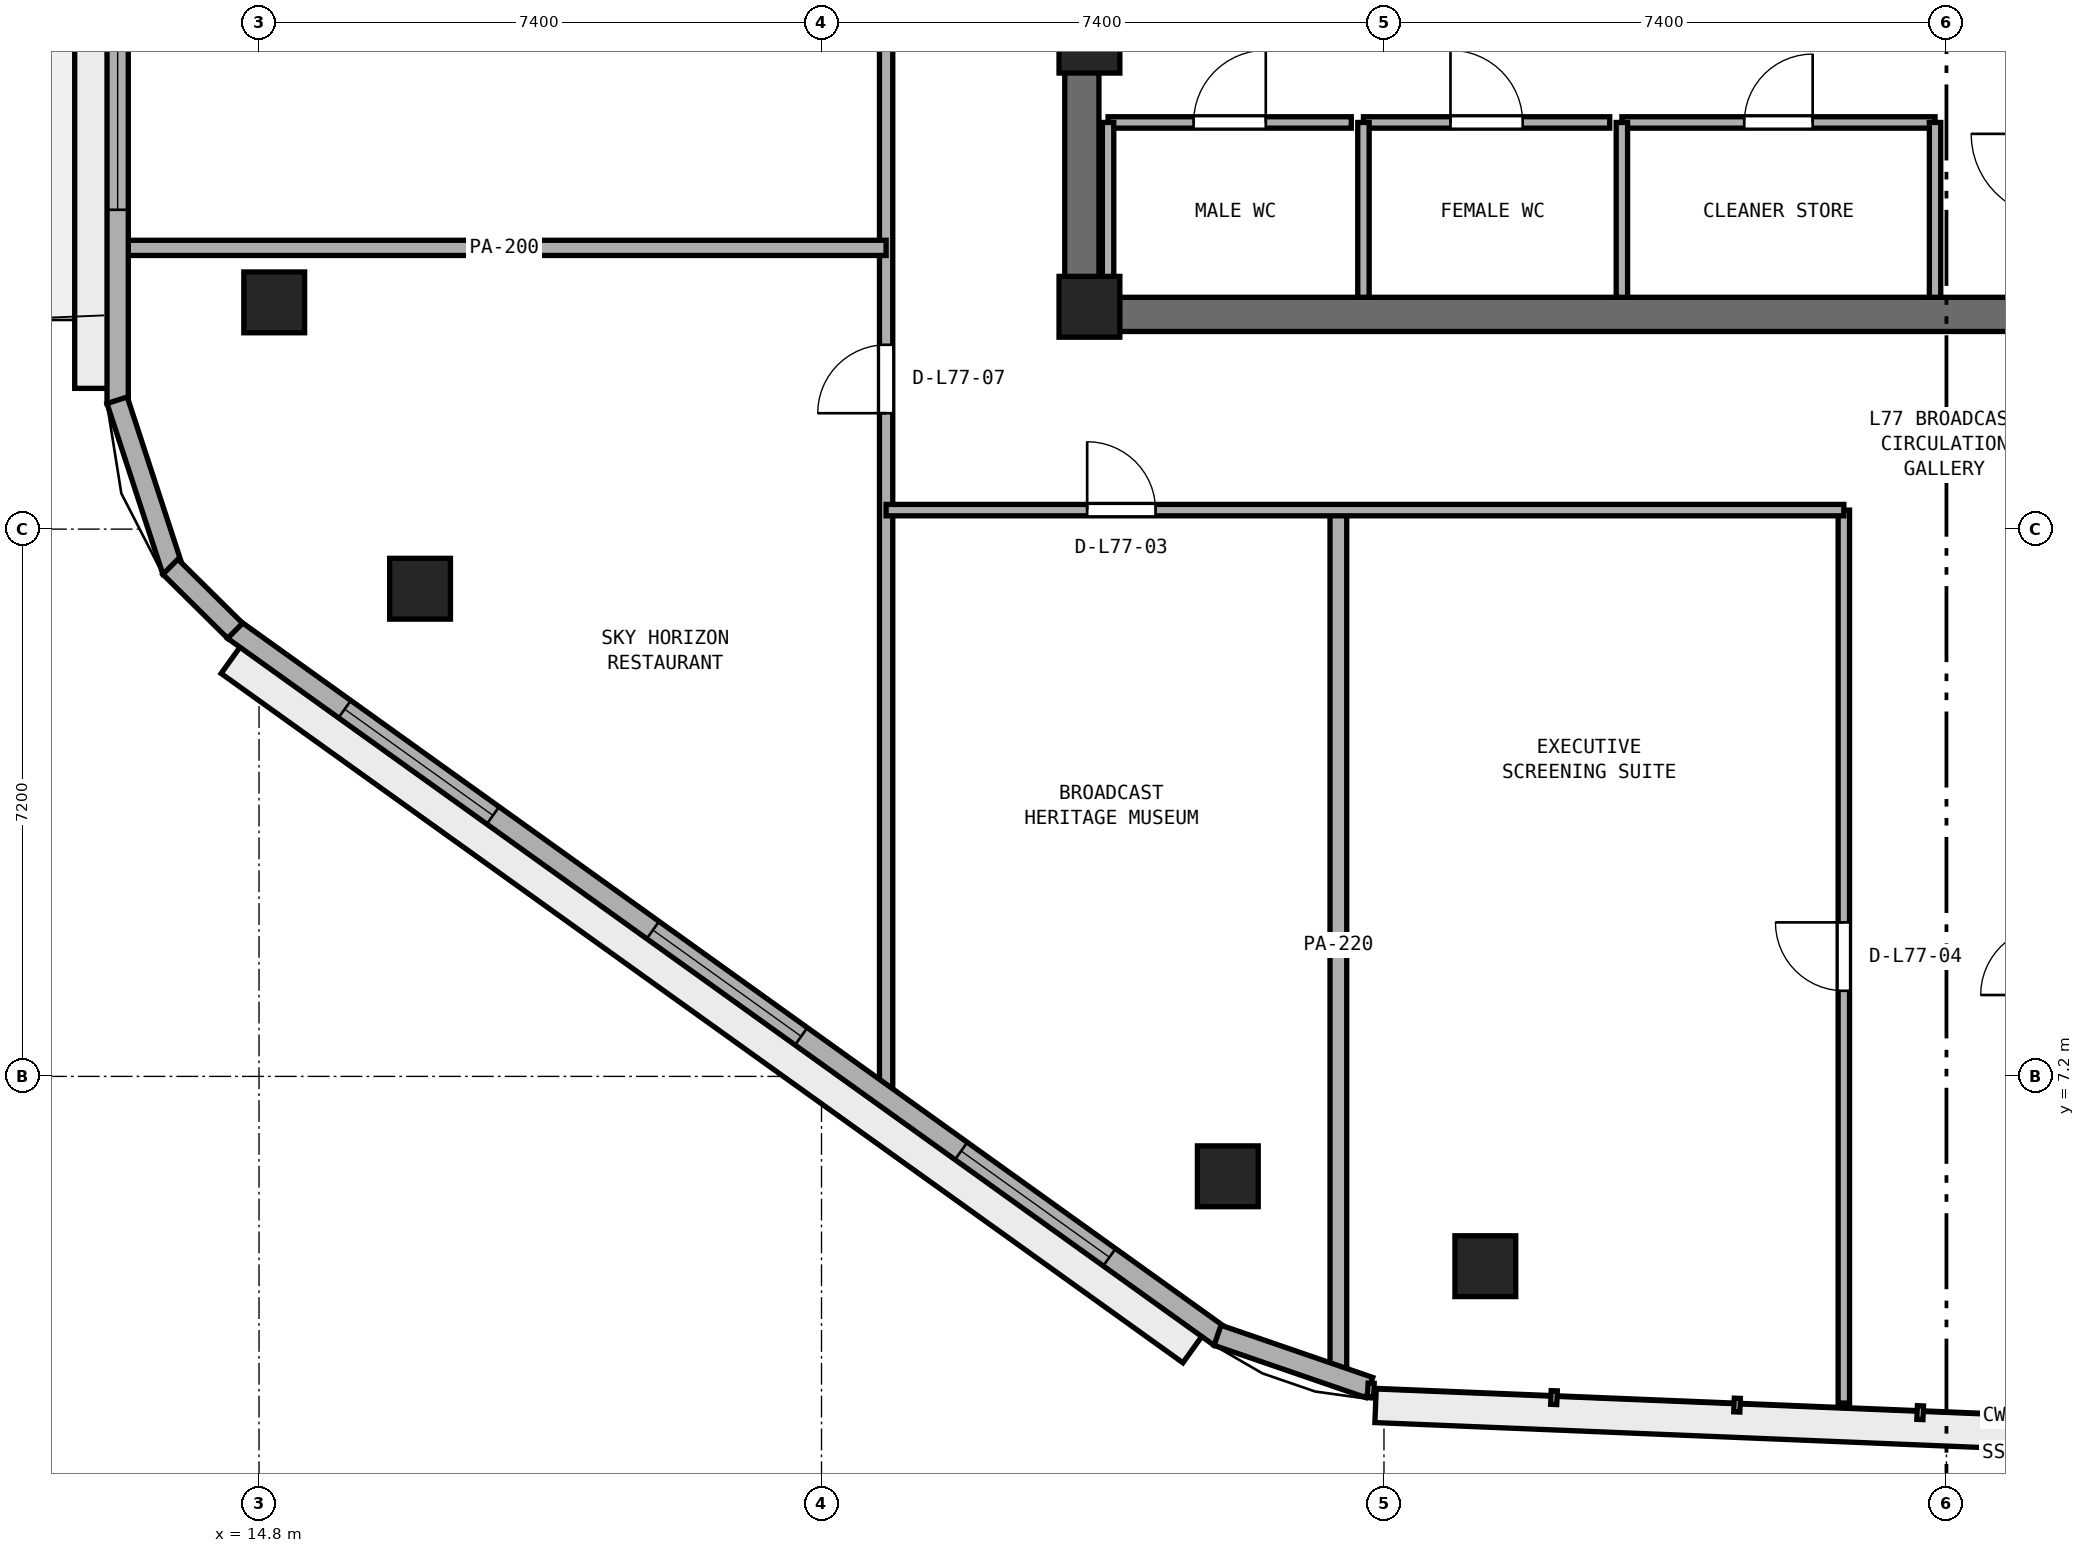
"""IFC4 building model, lengths in metres.
Left out: names, types, materials, properties, quantities, classifications, styles, units other than length and angle.
Written with IfcOpenShell. Run it as: python <this file> out.ifc"""

import sys

from ifc_helpers import new_model, si_unit, direction, frame, frame_2d, origin, origin_2d, place, context, subcontext, project, spatial, rectangle, extrude, element, fill, save


model = new_model("IFC4")
c1 = context("Model", 3, precision=1e-05, world=origin(), true_north=direction((0.0, 1.0)))
c2 = subcontext(c1, "Body", "Model", "MODEL_VIEW")
j1 = project(units=[si_unit("LENGTHUNIT", "METRE"), si_unit("PLANEANGLEUNIT", "RADIAN")], contexts=[c1])
p1 = place(None, origin())
s1 = spatial("IfcSite", under=j1, at=p1, CompositionType="ELEMENT")
p2 = place(p1, origin())
s2 = spatial("IfcBuilding", under=s1, at=p2, CompositionType="ELEMENT")
p3 = place(p2, frame((0.0, 0.0, 301.0)))
s3 = spatial("IfcBuildingStorey", under=s2, at=p3, CompositionType="ELEMENT", Elevation=301.0)
p4 = place(p3, frame((25.4, 17.225, 0.0), z_axis=(0.0, 0.0, 1.0), x_axis=(1.0, 0.0, 0.0)))
e1 = element("IfcWall", 1, at=p4, inside=s3, PredefinedType="SHEAR", context=c2, shape_type="SweptSolid", body=[
    extrude(rectangle(XDim=23.2, YDim=0.45, at=frame_2d((11.6, 0.0))), origin(), (0.0, 0.0, 1.0), 3.54),
])
p5 = place(p3, frame((25.625, 17.45, 0.0), z_axis=(0.0, 0.0, 1.0), x_axis=(0.0, 1.0, 0.0)))
e2 = element("IfcWall", 2, at=p5, inside=s3, PredefinedType="SHEAR", context=c2, shape_type="SweptSolid", body=[
    extrude(rectangle(XDim=15.5, YDim=0.45, at=frame_2d((7.75, 0.0))), origin(), (0.0, 0.0, 1.0), 3.54),
])
p6 = place(p5, frame((7.0, 0.0, 0.0)))
e3 = element("IfcOpeningElement", 3, at=p6, cuts=e2, PredefinedType="OPENING", context=c2, shape_type="SweptSolid", body=[
    extrude(rectangle(XDim=1.5, YDim=2.15, at=frame_2d((0.75, 1.075))), frame((0.0, 0.235, 0.0), z_axis=(0.0, -1.0, 0.0), x_axis=(1.0, 0.0, 0.0)), (0.0, 0.0, 1.0), 0.47),
])
for number, where, z_axis, x_axis in (
    (4, (25.725, 17.325, 0.0), (0.0, 0.0, 1.0), (1.0, 0.0, 0.0)),
    (5, (25.725, 20.8, 0.0), (0.0, 0.0, 1.0), (1.0, 0.0, 0.0)),
):
    element("IfcColumn", number, at=place(p3, frame(where, z_axis=z_axis, x_axis=x_axis)), inside=s3, PredefinedType="PILASTER", context=c2, shape_type="SweptSolid", body=[
        extrude(rectangle(XDim=0.8, YDim=0.8, at=origin_2d()), origin(), (0.0, 0.0, 1.0), 3.8),
    ])
for number, where, z_axis, x_axis in (
    (6, (30.934, 4.703, 0.0), (0.0, 0.0, 1.0), (1.0, 0.0, 0.0)),
    (7, (15.0, 17.383, 0.0), (0.0, 0.0, 1.0), (1.0, 0.0, 0.0)),
    (8, (16.918, 13.616, 0.0), (0.0, 0.0, 1.0), (1.0, 0.0, 0.0)),
    (9, (27.545, 5.886, 0.0), (0.0, 0.0, 1.0), (1.0, 0.0, 0.0)),
):
    element("IfcColumn", number, at=place(p3, frame(where, z_axis=z_axis, x_axis=x_axis)), inside=s3, PredefinedType="COLUMN", context=c2, shape_type="SweptSolid", body=[
        extrude(rectangle(XDim=0.8, YDim=0.8, at=origin_2d()), origin(), (0.0, 0.0, 1.0), 3.8),
    ])
p7 = place(p3, frame((25.97, 19.75, 0.0), z_axis=(0.0, 0.0, 1.0), x_axis=(1.0, 0.0, 0.0)))
e10 = element("IfcWall", 10, at=p7, inside=s3, PredefinedType="PARTITIONING", context=c2, shape_type="SweptSolid", body=[
    extrude(rectangle(XDim=3.2, YDim=0.15, at=frame_2d((1.6, 0.0))), origin(), (0.0, 0.0, 1.0), 3.54),
])
p8 = place(p7, frame((1.125, 0.0, 0.0)))
e11 = element("IfcOpeningElement", 11, at=p8, cuts=e10, PredefinedType="OPENING", context=c2, shape_type="SweptSolid", body=[
    extrude(rectangle(XDim=0.95, YDim=2.1, at=frame_2d((0.475, 1.05))), frame((0.0, 0.085, 0.0), z_axis=(0.0, -1.0, 0.0), x_axis=(1.0, 0.0, 0.0)), (0.0, 0.0, 1.0), 0.17),
])
p9 = place(p3, frame((25.97, 17.45, 0.0), z_axis=(0.0, 0.0, 1.0), x_axis=(0.0, 1.0, 0.0)))
e12 = element("IfcWall", 12, at=p9, inside=s3, PredefinedType="PARTITIONING", context=c2, shape_type="SweptSolid", body=[
    extrude(rectangle(XDim=2.3, YDim=0.15, at=frame_2d((1.15, 0.0))), origin(), (0.0, 0.0, 1.0), 2.64),
])
p10 = place(p3, frame((29.33, 19.75, 0.0), z_axis=(0.0, 0.0, 1.0), x_axis=(1.0, 0.0, 0.0)))
e13 = element("IfcWall", 13, at=p10, inside=s3, PredefinedType="PARTITIONING", context=c2, shape_type="SweptSolid", body=[
    extrude(rectangle(XDim=3.24, YDim=0.15, at=frame_2d((1.62, 0.0))), origin(), (0.0, 0.0, 1.0), 3.54),
])
p11 = place(p10, frame((1.145, 0.0, 0.0)))
e14 = element("IfcOpeningElement", 14, at=p11, cuts=e13, PredefinedType="OPENING", context=c2, shape_type="SweptSolid", body=[
    extrude(rectangle(XDim=0.95, YDim=2.1, at=frame_2d((0.475, 1.05))), frame((0.0, 0.085, 0.0), z_axis=(0.0, -1.0, 0.0), x_axis=(1.0, 0.0, 0.0)), (0.0, 0.0, 1.0), 0.17),
])
p12 = place(p3, frame((29.33, 17.45, 0.0), z_axis=(0.0, 0.0, 1.0), x_axis=(0.0, 1.0, 0.0)))
e15 = element("IfcWall", 15, at=p12, inside=s3, PredefinedType="PARTITIONING", context=c2, shape_type="SweptSolid", body=[
    extrude(rectangle(XDim=2.3, YDim=0.15, at=frame_2d((1.15, 0.0))), origin(), (0.0, 0.0, 1.0), 3.54),
])
p13 = place(p3, frame((32.73, 19.75, 0.0), z_axis=(0.0, 0.0, 1.0), x_axis=(1.0, 0.0, 0.0)))
e16 = element("IfcWall", 16, at=p13, inside=s3, PredefinedType="PARTITIONING", context=c2, shape_type="SweptSolid", body=[
    extrude(rectangle(XDim=4.12, YDim=0.15, at=frame_2d((2.06, 0.0))), origin(), (0.0, 0.0, 1.0), 3.54),
])
p14 = place(p13, frame((1.61, 0.0, 0.0)))
e17 = element("IfcOpeningElement", 17, at=p14, cuts=e16, PredefinedType="OPENING", context=c2, shape_type="SweptSolid", body=[
    extrude(rectangle(XDim=0.9, YDim=2.1, at=frame_2d((0.45, 1.05))), frame((0.0, 0.085, 0.0), z_axis=(0.0, -1.0, 0.0), x_axis=(1.0, 0.0, 0.0)), (0.0, 0.0, 1.0), 0.17),
])
for number, where, z_axis, x_axis in (
    (18, (32.73, 17.45, 0.0), (0.0, 0.0, 1.0), (0.0, 1.0, 0.0)),
    (19, (36.85, 17.45, 0.0), (0.0, 0.0, 1.0), (0.0, 1.0, 0.0)),
):
    element("IfcWall", number, at=place(p3, frame(where, z_axis=z_axis, x_axis=x_axis)), inside=s3, PredefinedType="PARTITIONING", context=c2, shape_type="SweptSolid", body=[
        extrude(rectangle(XDim=2.3, YDim=0.15, at=frame_2d((1.15, 0.0))), origin(), (0.0, 0.0, 1.0), 3.54),
    ])
p15 = place(p3, frame((35.65, 2.902, 0.0), z_axis=(0.0, 0.0, 1.0), x_axis=(0.0, 1.0, 0.0)))
e20 = element("IfcWall", 20, at=p15, inside=s3, PredefinedType="PARTITIONING", context=c2, shape_type="SweptSolid", body=[
    extrude(rectangle(XDim=11.748, YDim=0.15, at=frame_2d((5.874, 0.0))), origin(), (0.0, 0.0, 1.0), 3.54),
])
p16 = place(p15, frame((5.424, 0.0, 0.0)))
e21 = element("IfcOpeningElement", 21, at=p16, cuts=e20, PredefinedType="OPENING", context=c2, shape_type="SweptSolid", body=[
    extrude(rectangle(XDim=0.9, YDim=2.1, at=frame_2d((0.45, 1.05))), frame((0.0, 0.085, 0.0), z_axis=(0.0, -1.0, 0.0), x_axis=(1.0, 0.0, 0.0)), (0.0, 0.0, 1.0), 0.17),
])
p17 = place(p3, frame((29.0, 3.217, 0.0), z_axis=(0.0, 0.0, 1.0), x_axis=(0.0, 1.0, 0.0)))
e22 = element("IfcWall", 22, at=p17, inside=s3, PredefinedType="PARTITIONING", context=c2, shape_type="SweptSolid", body=[
    extrude(rectangle(XDim=11.433, YDim=0.22, at=frame_2d((5.716, 0.0))), origin(), (0.0, 0.0, 1.0), 3.54),
])
p18 = place(p3, frame((23.05, 6.894, 0.0), z_axis=(0.0, 0.0, 1.0), x_axis=(0.0, 1.0, 0.0)))
e23 = element("IfcWall", 23, at=p18, inside=s3, PredefinedType="PARTITIONING", context=c2, shape_type="SweptSolid", body=[
    extrude(rectangle(XDim=36.312, YDim=0.175, at=frame_2d((18.156, 0.0))), origin(), (0.0, 0.0, 1.0), 3.54),
])
p19 = place(p18, frame((9.031, 0.0, 0.0)))
e24 = element("IfcOpeningElement", 24, at=p19, cuts=e23, PredefinedType="OPENING", context=c2, shape_type="SweptSolid", body=[
    extrude(rectangle(XDim=0.9, YDim=2.1, at=frame_2d((0.45, 1.05))), frame((0.0, 0.097, 0.0), z_axis=(0.0, -1.0, 0.0), x_axis=(1.0, 0.0, 0.0)), (0.0, 0.0, 1.0), 0.195),
])
p20 = place(p18, frame((14.056, 0.0, 0.0)))
e25 = element("IfcOpeningElement", 25, at=p20, cuts=e23, PredefinedType="OPENING", context=c2, shape_type="SweptSolid", body=[
    extrude(rectangle(XDim=0.9, YDim=2.1, at=frame_2d((0.45, 1.05))), frame((0.0, 0.097, 0.0), z_axis=(0.0, -1.0, 0.0), x_axis=(1.0, 0.0, 0.0)), (0.0, 0.0, 1.0), 0.195),
])
p21 = place(p18, frame((20.606, 0.0, 0.0)))
e26 = element("IfcOpeningElement", 26, at=p21, cuts=e23, PredefinedType="OPENING", context=c2, shape_type="SweptSolid", body=[
    extrude(rectangle(XDim=1.0, YDim=2.12, at=frame_2d((0.5, 1.06))), frame((0.0, 0.097, 0.0), z_axis=(0.0, -1.0, 0.0), x_axis=(1.0, 0.0, 0.0)), (0.0, 0.0, 1.0), 0.195),
])
p22 = place(p18, frame((26.181, 0.0, 0.0)))
e27 = element("IfcOpeningElement", 27, at=p22, cuts=e23, PredefinedType="OPENING", context=c2, shape_type="SweptSolid", body=[
    extrude(rectangle(XDim=0.9, YDim=2.1, at=frame_2d((0.45, 1.05))), frame((0.0, 0.097, 0.0), z_axis=(0.0, -1.0, 0.0), x_axis=(1.0, 0.0, 0.0)), (0.0, 0.0, 1.0), 0.195),
])
p23 = place(p3, frame((23.05, 14.65, 0.0), z_axis=(0.0, 0.0, 1.0), x_axis=(1.0, 0.0, 0.0)))
e28 = element("IfcWall", 28, at=p23, inside=s3, PredefinedType="PARTITIONING", context=c2, shape_type="SweptSolid", body=[
    extrude(rectangle(XDim=12.6, YDim=0.15, at=frame_2d((6.3, 0.0))), origin(), (0.0, 0.0, 1.0), 3.54),
])
p24 = place(p23, frame((2.645, 0.0, 0.0)))
e29 = element("IfcOpeningElement", 29, at=p24, cuts=e28, PredefinedType="OPENING", context=c2, shape_type="SweptSolid", body=[
    extrude(rectangle(XDim=0.9, YDim=2.1, at=frame_2d((0.45, 1.05))), frame((0.0, 0.085, 0.0), z_axis=(0.0, -1.0, 0.0), x_axis=(1.0, 0.0, 0.0)), (0.0, 0.0, 1.0), 0.17),
])
p25 = place(p3, frame((13.005, 18.1, 0.0), z_axis=(0.0, 0.0, 1.0), x_axis=(1.0, 0.0, 0.0)))
e30 = element("IfcWall", 30, at=p25, inside=s3, PredefinedType="PARTITIONING", context=c2, shape_type="SweptSolid", body=[
    extrude(rectangle(XDim=10.045, YDim=0.2, at=frame_2d((5.022, 0.0))), origin(), (0.0, 0.0, 1.0), 3.54),
])
p26 = place(p3, frame((12.94, 33.548, 0.0), z_axis=(0.0, 0.0, 1.0), x_axis=(0.0, -1.0, 0.0)))
e31 = element("IfcWall", 31, at=p26, inside=s3, PredefinedType="STANDARD", context=c2, shape_type="SweptSolid", body=[
    extrude(rectangle(XDim=17.496, YDim=0.28, at=frame_2d((8.748, 0.0))), origin(), (0.0, 0.0, 1.0), 3.54),
])
p27 = place(p26, frame((9.198, 0.0, 0.0)))
e32 = element("IfcOpeningElement", 32, at=p27, cuts=e31, PredefinedType="OPENING", context=c2, shape_type="SweptSolid", body=[
    extrude(rectangle(XDim=1.1, YDim=2.2, at=frame_2d((0.55, 1.1))), frame((0.0, 0.15, 0.0), z_axis=(0.0, -1.0, 0.0), x_axis=(1.0, 0.0, 0.0)), (0.0, 0.0, 1.0), 0.3),
])
p28 = place(p26, frame((2.549, 0.0, 0.9)))
e33 = element("IfcOpeningElement", 33, at=p28, cuts=e31, PredefinedType="OPENING", context=c2, shape_type="SweptSolid", body=[
    extrude(rectangle(XDim=2.4, YDim=1.75, at=frame_2d((1.2, 0.875))), frame((0.0, 0.15, 0.0), z_axis=(0.0, -1.0, 0.0), x_axis=(1.0, 0.0, 0.0)), (0.0, 0.0, 1.0), 0.3),
])
p29 = place(p26, frame((12.547, 0.0, 0.9)))
e34 = element("IfcOpeningElement", 34, at=p29, cuts=e31, PredefinedType="OPENING", context=c2, shape_type="SweptSolid", body=[
    extrude(rectangle(XDim=2.4, YDim=1.75, at=frame_2d((1.2, 0.875))), frame((0.0, 0.15, 0.0), z_axis=(0.0, -1.0, 0.0), x_axis=(1.0, 0.0, 0.0)), (0.0, 0.0, 1.0), 0.3),
])
p30 = place(p3, frame((14.468, 13.077, 0.0), z_axis=(0.0, 0.0, 1.0), x_axis=(0.812809888039, -0.582529042972, 0.0)))
e35 = element("IfcWall", 35, at=p30, inside=s3, PredefinedType="STANDARD", context=c2, shape_type="SweptSolid", body=[
    extrude(rectangle(XDim=15.968, YDim=0.28, at=frame_2d((7.984, 0.0))), origin(), (0.0, 0.0, 1.0), 3.54),
])
p31 = place(p30, frame((1.795, 0.0, 0.9)))
e36 = element("IfcOpeningElement", 36, at=p31, cuts=e35, PredefinedType="OPENING", context=c2, shape_type="SweptSolid", body=[
    extrude(rectangle(XDim=2.4, YDim=1.75, at=frame_2d((1.2, 0.875))), frame((0.0, 0.15, 0.0), z_axis=(0.0, -1.0, 0.0), x_axis=(1.0, 0.0, 0.0)), (0.0, 0.0, 1.0), 0.3),
])
p32 = place(p30, frame((6.784, 0.0, 0.9)))
e37 = element("IfcOpeningElement", 37, at=p32, cuts=e35, PredefinedType="OPENING", context=c2, shape_type="SweptSolid", body=[
    extrude(rectangle(XDim=2.4, YDim=1.75, at=frame_2d((1.2, 0.875))), frame((0.0, 0.15, 0.0), z_axis=(0.0, -1.0, 0.0), x_axis=(1.0, 0.0, 0.0)), (0.0, 0.0, 1.0), 0.3),
])
p33 = place(p30, frame((11.773, 0.0, 0.9)))
e38 = element("IfcOpeningElement", 38, at=p33, cuts=e35, PredefinedType="OPENING", context=c2, shape_type="SweptSolid", body=[
    extrude(rectangle(XDim=2.4, YDim=1.75, at=frame_2d((1.2, 0.875))), frame((0.0, 0.15, 0.0), z_axis=(0.0, -1.0, 0.0), x_axis=(1.0, 0.0, 0.0)), (0.0, 0.0, 1.0), 0.3),
])
p34 = place(p3, frame((12.933, 16.095, 0.0), z_axis=(0.0, 0.0, 1.0), x_axis=(0.3110492363, -0.950393798695, 0.0)))
e39 = element("IfcWall", 39, at=p34, inside=s3, PredefinedType="STANDARD", context=c2, shape_type="SweptSolid", body=[
    extrude(rectangle(XDim=2.364, YDim=0.28, at=frame_2d((1.182, 0.0))), origin(), (0.0, 0.0, 1.0), 3.54),
])
p35 = place(p3, frame((13.634, 13.904, 0.0), z_axis=(0.0, 0.0, 1.0), x_axis=(0.710971221429, -0.703221104845, 0.0)))
e40 = element("IfcWall", 40, at=p35, inside=s3, PredefinedType="STANDARD", context=c2, shape_type="SweptSolid", body=[
    extrude(rectangle(XDim=1.197, YDim=0.28, at=frame_2d((0.599, 0.0))), origin(), (0.0, 0.0, 1.0), 3.54),
])
p36 = place(p3, frame((27.411, 3.794, 0.0), z_axis=(0.0, 0.0, 1.0), x_axis=(0.945562091627, -0.325441747289, 0.0)))
e41 = element("IfcWall", 41, at=p36, inside=s3, PredefinedType="STANDARD", context=c2, shape_type="SweptSolid", body=[
    extrude(rectangle(XDim=2.111, YDim=0.28, at=frame_2d((1.056, 0.0))), origin(), (0.0, 0.0, 1.0), 3.54),
])
p37 = place(p8, origin())
e42 = element("IfcDoor", 42, at=p37, inside=s3, OperationType="SINGLE_SWING_RIGHT", PredefinedType="DOOR", context=c2, shape_type="SweptSolid", body=[
    extrude(rectangle(XDim=0.95, YDim=2.1, at=frame_2d((0.475, 1.05))), frame((0.0, 0.025, 0.0), z_axis=(0.0, -1.0, 0.0), x_axis=(1.0, 0.0, 0.0)), (0.0, 0.0, 1.0), 0.05),
])
fill(e11, e42)
p38 = place(p11, origin())
e43 = element("IfcDoor", 43, at=p38, inside=s3, OperationType="SINGLE_SWING_LEFT", PredefinedType="DOOR", context=c2, shape_type="SweptSolid", body=[
    extrude(rectangle(XDim=0.95, YDim=2.1, at=frame_2d((0.475, 1.05))), frame((0.0, 0.025, 0.0), z_axis=(0.0, -1.0, 0.0), x_axis=(1.0, 0.0, 0.0)), (0.0, 0.0, 1.0), 0.05),
])
fill(e14, e43)
p39 = place(p14, origin())
e44 = element("IfcDoor", 44, at=p39, inside=s3, OperationType="SINGLE_SWING_RIGHT", PredefinedType="DOOR", context=c2, shape_type="SweptSolid", body=[
    extrude(rectangle(XDim=0.9, YDim=2.1, at=frame_2d((0.45, 1.05))), frame((0.0, 0.025, 0.0), z_axis=(0.0, -1.0, 0.0), x_axis=(1.0, 0.0, 0.0)), (0.0, 0.0, 1.0), 0.05),
])
fill(e17, e44)
p40 = place(p24, origin())
e45 = element("IfcDoor", 45, at=p40, inside=s3, OperationType="SINGLE_SWING_LEFT", PredefinedType="DOOR", context=c2, shape_type="SweptSolid", body=[
    extrude(rectangle(XDim=0.9, YDim=2.1, at=frame_2d((0.45, 1.05))), frame((0.0, 0.025, 0.0), z_axis=(0.0, -1.0, 0.0), x_axis=(1.0, 0.0, 0.0)), (0.0, 0.0, 1.0), 0.05),
])
fill(e29, e45)
p41 = place(p16, origin())
e46 = element("IfcDoor", 46, at=p41, inside=s3, OperationType="SINGLE_SWING_RIGHT", PredefinedType="DOOR", context=c2, shape_type="SweptSolid", body=[
    extrude(rectangle(XDim=0.9, YDim=2.1, at=frame_2d((0.45, 1.05))), frame((0.0, 0.025, 0.0), z_axis=(0.0, -1.0, 0.0), x_axis=(1.0, 0.0, 0.0)), (0.0, 0.0, 1.0), 0.05),
])
fill(e21, e46)
p42 = place(p19, origin())
e47 = element("IfcDoor", 47, at=p42, inside=s3, OperationType="SINGLE_SWING_LEFT", PredefinedType="DOOR", context=c2, shape_type="SweptSolid", body=[
    extrude(rectangle(XDim=0.9, YDim=2.1, at=frame_2d((0.45, 1.05))), frame((0.0, 0.025, 0.0), z_axis=(0.0, -1.0, 0.0), x_axis=(1.0, 0.0, 0.0)), (0.0, 0.0, 1.0), 0.05),
])
fill(e24, e47)
p43 = place(p29, origin())
e48 = element("IfcWindow", 48, at=p43, inside=s3, PartitioningType="SINGLE_PANEL", PredefinedType="WINDOW", context=c2, shape_type="SweptSolid", body=[
    extrude(rectangle(XDim=2.4, YDim=1.75, at=frame_2d((1.2, 0.875))), frame((0.0, 0.03, 0.0), z_axis=(0.0, -1.0, 0.0), x_axis=(1.0, 0.0, 0.0)), (0.0, 0.0, 1.0), 0.06),
])
fill(e34, e48)
p44 = place(p31, origin())
e49 = element("IfcWindow", 49, at=p44, inside=s3, PartitioningType="SINGLE_PANEL", PredefinedType="WINDOW", context=c2, shape_type="SweptSolid", body=[
    extrude(rectangle(XDim=2.4, YDim=1.75, at=frame_2d((1.2, 0.875))), frame((0.0, 0.03, 0.0), z_axis=(0.0, -1.0, 0.0), x_axis=(1.0, 0.0, 0.0)), (0.0, 0.0, 1.0), 0.06),
])
fill(e36, e49)
p45 = place(p32, origin())
e50 = element("IfcWindow", 50, at=p45, inside=s3, PartitioningType="SINGLE_PANEL", PredefinedType="WINDOW", context=c2, shape_type="SweptSolid", body=[
    extrude(rectangle(XDim=2.4, YDim=1.75, at=frame_2d((1.2, 0.875))), frame((0.0, 0.03, 0.0), z_axis=(0.0, -1.0, 0.0), x_axis=(1.0, 0.0, 0.0)), (0.0, 0.0, 1.0), 0.06),
])
fill(e37, e50)
p46 = place(p33, origin())
e51 = element("IfcWindow", 51, at=p46, inside=s3, PartitioningType="SINGLE_PANEL", PredefinedType="WINDOW", context=c2, shape_type="SweptSolid", body=[
    extrude(rectangle(XDim=2.4, YDim=1.75, at=frame_2d((1.2, 0.875))), frame((0.0, 0.03, 0.0), z_axis=(0.0, -1.0, 0.0), x_axis=(1.0, 0.0, 0.0)), (0.0, 0.0, 1.0), 0.06),
])
fill(e38, e51)
save(model, sys.argv[1])
